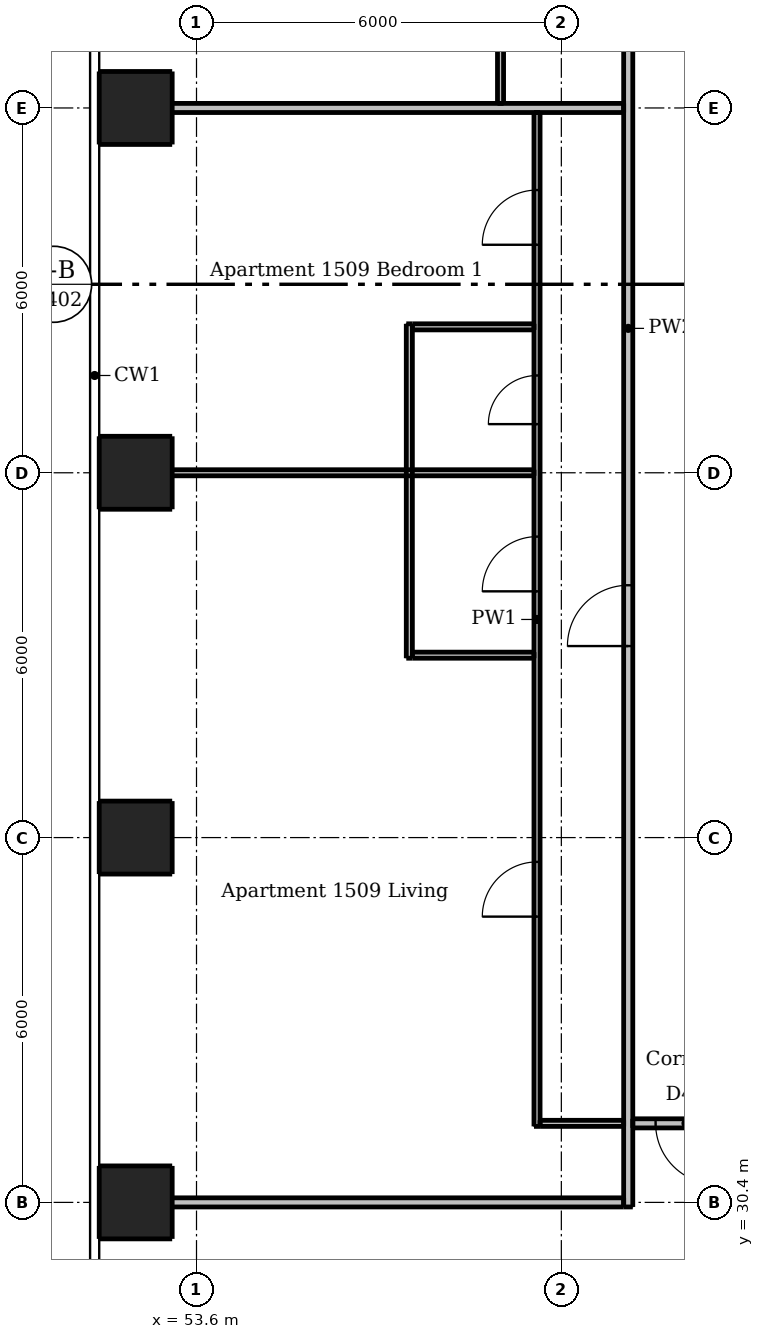
"""IFC4 building model, lengths in metres.
Left out: names, types, materials, properties, quantities, classifications, styles, units other than length and angle.
Written with IfcOpenShell. Run it as: python <this file> out.ifc"""

import sys

from ifc_helpers import new_model, si_unit, direction, frame, frame_2d, origin, origin_2d, place, context, subcontext, project, spatial, rectangle, extrude, element, fill, save


model = new_model("IFC4")
c1 = context("Model", 3, precision=1e-05, world=origin(), true_north=direction((0.0, 1.0)))
c2 = subcontext(c1, "Body", "Model", "MODEL_VIEW")
j1 = project(units=[si_unit("LENGTHUNIT", "METRE"), si_unit("PLANEANGLEUNIT", "RADIAN")], contexts=[c1])
p1 = place(None, origin())
s1 = spatial("IfcSite", under=j1, at=p1, CompositionType="ELEMENT")
p2 = place(p1, origin())
s2 = spatial("IfcBuilding", under=s1, at=p2, CompositionType="ELEMENT")
p3 = place(p2, frame((0.0, 0.0, 56.5)))
s3 = spatial("IfcBuildingStorey", under=s2, at=p3, CompositionType="ELEMENT", Elevation=56.5)
for number, where, z_axis, x_axis in (
    (1, (52.6, 30.4, 0.0), (0.0, 0.0, 1.0), (1.0, 0.0, 0.0)),
    (2, (52.6, 36.4, 0.0), (0.0, 0.0, 1.0), (1.0, 0.0, 0.0)),
    (3, (52.6, 42.4, 0.0), (0.0, 0.0, 1.0), (1.0, 0.0, 0.0)),
    (4, (52.6, 48.4, 0.0), (0.0, 0.0, 1.0), (1.0, 0.0, 0.0)),
):
    element("IfcColumn", number, at=place(p3, frame(where, z_axis=z_axis, x_axis=x_axis)), inside=s3, PredefinedType="COLUMN", context=c2, shape_type="SweptSolid", body=[
        extrude(rectangle(XDim=1.2, YDim=1.2, at=origin_2d()), origin(), (0.0, 0.0, 1.0), 3.05),
    ])
p4 = place(p3, frame((57.1, 39.35, 0.0), z_axis=(0.0, 0.0, 1.0), x_axis=(0.0, 1.0, 0.0)))
e5 = element("IfcWall", 5, at=p4, inside=s3, PredefinedType="PARTITIONING", context=c2, shape_type="SweptSolid", body=[
    extrude(rectangle(XDim=5.5, YDim=0.1, at=frame_2d((2.75, 0.0))), origin(), (0.0, 0.0, 1.0), 3.05),
])
p5 = place(p3, frame((58.6, 54.35, 0.0), z_axis=(0.0, 0.0, 1.0), x_axis=(0.0, -1.0, 0.0)))
e6 = element("IfcWall", 6, at=p5, inside=s3, PredefinedType="PARTITIONING", context=c2, shape_type="SweptSolid", body=[
    extrude(rectangle(XDim=5.875, YDim=0.1, at=frame_2d((2.938, 0.0))), origin(), (0.0, 0.0, 1.0), 3.05),
])
p6 = place(p5, frame((3.75, 0.0, 0.0)))
e7 = element("IfcOpeningElement", 7, at=p6, cuts=e6, PredefinedType="OPENING", context=c2, shape_type="SweptSolid", body=[
    extrude(rectangle(XDim=0.8, YDim=2.1, at=frame_2d((0.4, 1.05))), frame((0.0, 0.06, 0.0), z_axis=(0.0, -1.0, 0.0), x_axis=(1.0, 0.0, 0.0)), (0.0, 0.0, 1.0), 0.12),
])
p7 = place(p3, frame((59.2, 31.65, 0.0), z_axis=(0.0, 0.0, 1.0), x_axis=(0.0, 1.0, 0.0)))
e8 = element("IfcWall", 8, at=p7, inside=s3, PredefinedType="PARTITIONING", context=c2, shape_type="SweptSolid", body=[
    extrude(rectangle(XDim=16.675, YDim=0.1, at=frame_2d((8.337, 0.0))), origin(), (0.0, 0.0, 1.0), 3.05),
])
p8 = place(p7, frame((3.45, 0.0, 0.0)))
e9 = element("IfcOpeningElement", 9, at=p8, cuts=e8, PredefinedType="OPENING", context=c2, shape_type="SweptSolid", body=[
    extrude(rectangle(XDim=0.9, YDim=2.1, at=frame_2d((0.45, 1.05))), frame((0.0, 0.06, 0.0), z_axis=(0.0, -1.0, 0.0), x_axis=(1.0, 0.0, 0.0)), (0.0, 0.0, 1.0), 0.12),
])
p9 = place(p7, frame((8.8, 0.0, 0.0)))
e10 = element("IfcOpeningElement", 10, at=p9, cuts=e8, PredefinedType="OPENING", context=c2, shape_type="SweptSolid", body=[
    extrude(rectangle(XDim=0.9, YDim=2.1, at=frame_2d((0.45, 1.05))), frame((0.0, 0.06, 0.0), z_axis=(0.0, -1.0, 0.0), x_axis=(1.0, 0.0, 0.0)), (0.0, 0.0, 1.0), 0.12),
])
p10 = place(p7, frame((14.5, 0.0, 0.0)))
e11 = element("IfcOpeningElement", 11, at=p10, cuts=e8, PredefinedType="OPENING", context=c2, shape_type="SweptSolid", body=[
    extrude(rectangle(XDim=0.9, YDim=2.1, at=frame_2d((0.45, 1.05))), frame((0.0, 0.06, 0.0), z_axis=(0.0, -1.0, 0.0), x_axis=(1.0, 0.0, 0.0)), (0.0, 0.0, 1.0), 0.12),
])
p11 = place(p7, frame((11.55, 0.0, 0.0)))
e12 = element("IfcOpeningElement", 12, at=p11, cuts=e8, PredefinedType="OPENING", context=c2, shape_type="SweptSolid", body=[
    extrude(rectangle(XDim=0.8, YDim=2.1, at=frame_2d((0.4, 1.05))), frame((0.0, 0.06, 0.0), z_axis=(0.0, -1.0, 0.0), x_axis=(1.0, 0.0, 0.0)), (0.0, 0.0, 1.0), 0.12),
])
p12 = place(p3, frame((57.15, 44.8, 0.0), z_axis=(0.0, 0.0, 1.0), x_axis=(1.0, 0.0, 0.0)))
e13 = element("IfcWall", 13, at=p12, inside=s3, PredefinedType="PARTITIONING", context=c2, shape_type="SweptSolid", body=[
    extrude(rectangle(XDim=2.0, YDim=0.1, at=frame_2d((1.0, 0.0))), origin(), (0.0, 0.0, 1.0), 3.05),
])
p13 = place(p3, frame((52.0, 42.4, 0.0), z_axis=(0.0, 0.0, 1.0), x_axis=(1.0, 0.0, 0.0)))
e14 = element("IfcWall", 14, at=p13, inside=s3, PredefinedType="PARTITIONING", context=c2, shape_type="SweptSolid", body=[
    extrude(rectangle(XDim=7.15, YDim=0.1, at=frame_2d((3.575, 0.0))), origin(), (0.0, 0.0, 1.0), 2.516),
])
p14 = place(p3, frame((57.15, 39.4, 0.0), z_axis=(0.0, 0.0, 1.0), x_axis=(1.0, 0.0, 0.0)))
e15 = element("IfcWall", 15, at=p14, inside=s3, PredefinedType="PARTITIONING", context=c2, shape_type="SweptSolid", body=[
    extrude(rectangle(XDim=2.0, YDim=0.1, at=frame_2d((1.0, 0.0))), origin(), (0.0, 0.0, 1.0), 3.05),
])
p15 = place(p3, frame((59.25, 31.7, 0.0), z_axis=(0.0, 0.0, 1.0), x_axis=(1.0, 0.0, 0.0)))
e16 = element("IfcWall", 16, at=p15, inside=s3, PredefinedType="PARTITIONING", context=c2, shape_type="SweptSolid", body=[
    extrude(rectangle(XDim=1.375, YDim=0.1, at=frame_2d((0.688, 0.0))), origin(), (0.0, 0.0, 1.0), 3.05),
])
p16 = place(p3, frame((60.7, 30.325, 0.0), z_axis=(0.0, 0.0, 1.0), x_axis=(0.0, 1.0, 0.0)))
e17 = element("IfcWall", 17, at=p16, inside=s3, PredefinedType="PARTITIONING", context=c2, shape_type="SweptSolid", body=[
    extrude(rectangle(XDim=28.9, YDim=0.15, at=frame_2d((14.45, 0.0))), origin(), (0.0, 0.0, 1.0), 3.05),
])
p17 = place(p16, frame((9.225, 0.0, 0.0)))
e18 = element("IfcOpeningElement", 18, at=p17, cuts=e17, PredefinedType="OPENING", context=c2, shape_type="SweptSolid", body=[
    extrude(rectangle(XDim=1.0, YDim=2.1, at=frame_2d((0.5, 1.05))), frame((0.0, 0.085, 0.0), z_axis=(0.0, -1.0, 0.0), x_axis=(1.0, 0.0, 0.0)), (0.0, 0.0, 1.0), 0.17),
])
p18 = place(p16, frame((26.025, 0.0, 0.0)))
e19 = element("IfcOpeningElement", 19, at=p18, cuts=e17, PredefinedType="OPENING", context=c2, shape_type="SweptSolid", body=[
    extrude(rectangle(XDim=1.0, YDim=2.1, at=frame_2d((0.5, 1.05))), frame((0.0, 0.085, 0.0), z_axis=(0.0, -1.0, 0.0), x_axis=(1.0, 0.0, 0.0)), (0.0, 0.0, 1.0), 0.17),
])
p19 = place(p3, frame((52.0, 48.4, 0.0), z_axis=(0.0, 0.0, 1.0), x_axis=(1.0, 0.0, 0.0)))
e20 = element("IfcWall", 20, at=p19, inside=s3, PredefinedType="PARTITIONING", context=c2, shape_type="SweptSolid", body=[
    extrude(rectangle(XDim=8.625, YDim=0.15, at=frame_2d((4.312, 0.0))), origin(), (0.0, 0.0, 1.0), 2.516),
])
p20 = place(p3, frame((89.525, 31.7, 0.0), z_axis=(0.0, 0.0, 1.0), x_axis=(-1.0, 0.0, 0.0)))
e21 = element("IfcWall", 21, at=p20, inside=s3, PredefinedType="PARTITIONING", context=c2, shape_type="SweptSolid", body=[
    extrude(rectangle(XDim=28.75, YDim=0.15, at=frame_2d((14.375, 0.0))), origin(), (0.0, 0.0, 1.0), 3.05),
])
p21 = place(p20, frame((27.375, 0.0, 0.0)))
e22 = element("IfcOpeningElement", 22, at=p21, cuts=e21, PredefinedType="OPENING", context=c2, shape_type="SweptSolid", body=[
    extrude(rectangle(XDim=1.0, YDim=2.1, at=frame_2d((0.5, 1.05))), frame((0.0, 0.085, 0.0), z_axis=(0.0, -1.0, 0.0), x_axis=(1.0, 0.0, 0.0)), (0.0, 0.0, 1.0), 0.17),
])
p22 = place(p20, frame((12.625, 0.0, 0.0)))
e23 = element("IfcOpeningElement", 23, at=p22, cuts=e21, PredefinedType="OPENING", context=c2, shape_type="SweptSolid", body=[
    extrude(rectangle(XDim=1.0, YDim=2.1, at=frame_2d((0.5, 1.05))), frame((0.0, 0.085, 0.0), z_axis=(0.0, -1.0, 0.0), x_axis=(1.0, 0.0, 0.0)), (0.0, 0.0, 1.0), 0.17),
])
p23 = place(p20, frame((4.225, 0.0, 0.0)))
e24 = element("IfcOpeningElement", 24, at=p23, cuts=e21, PredefinedType="OPENING", context=c2, shape_type="SweptSolid", body=[
    extrude(rectangle(XDim=1.0, YDim=2.1, at=frame_2d((0.5, 1.05))), frame((0.0, 0.085, 0.0), z_axis=(0.0, -1.0, 0.0), x_axis=(1.0, 0.0, 0.0)), (0.0, 0.0, 1.0), 0.17),
])
p24 = place(p3, frame((52.0, 30.4, 0.0), z_axis=(0.0, 0.0, 1.0), x_axis=(1.0, 0.0, 0.0)))
e25 = element("IfcWall", 25, at=p24, inside=s3, PredefinedType="PARTITIONING", context=c2, shape_type="SweptSolid", body=[
    extrude(rectangle(XDim=8.625, YDim=0.15, at=frame_2d((4.312, 0.0))), origin(), (0.0, 0.0, 1.0), 2.647),
])
p25 = place(p21, origin())
e26 = element("IfcDoor", 26, at=p25, inside=s3, OperationType="SINGLE_SWING_LEFT", PredefinedType="DOOR", context=c2, shape_type="SweptSolid", body=[
    extrude(rectangle(XDim=1.0, YDim=2.1, at=frame_2d((0.5, 1.05))), frame((0.0, 0.025, 0.0), z_axis=(0.0, -1.0, 0.0), x_axis=(1.0, 0.0, 0.0)), (0.0, 0.0, 1.0), 0.05),
])
fill(e22, e26)
p26 = place(p17, origin())
e27 = element("IfcDoor", 27, at=p26, inside=s3, OperationType="SINGLE_SWING_LEFT", PredefinedType="DOOR", context=c2, shape_type="SweptSolid", body=[
    extrude(rectangle(XDim=1.0, YDim=2.1, at=frame_2d((0.5, 1.05))), frame((0.0, 0.025, 0.0), z_axis=(0.0, -1.0, 0.0), x_axis=(1.0, 0.0, 0.0)), (0.0, 0.0, 1.0), 0.05),
])
fill(e18, e27)
p27 = place(p8, origin())
e28 = element("IfcDoor", 28, at=p27, inside=s3, OperationType="SINGLE_SWING_LEFT", PredefinedType="DOOR", context=c2, shape_type="SweptSolid", body=[
    extrude(rectangle(XDim=0.9, YDim=2.1, at=frame_2d((0.45, 1.05))), frame((0.0, 0.025, 0.0), z_axis=(0.0, -1.0, 0.0), x_axis=(1.0, 0.0, 0.0)), (0.0, 0.0, 1.0), 0.05),
])
fill(e9, e28)
p28 = place(p9, origin())
e29 = element("IfcDoor", 29, at=p28, inside=s3, OperationType="SINGLE_SWING_LEFT", PredefinedType="DOOR", context=c2, shape_type="SweptSolid", body=[
    extrude(rectangle(XDim=0.9, YDim=2.1, at=frame_2d((0.45, 1.05))), frame((0.0, 0.025, 0.0), z_axis=(0.0, -1.0, 0.0), x_axis=(1.0, 0.0, 0.0)), (0.0, 0.0, 1.0), 0.05),
])
fill(e10, e29)
p29 = place(p10, origin())
e30 = element("IfcDoor", 30, at=p29, inside=s3, OperationType="SINGLE_SWING_LEFT", PredefinedType="DOOR", context=c2, shape_type="SweptSolid", body=[
    extrude(rectangle(XDim=0.9, YDim=2.1, at=frame_2d((0.45, 1.05))), frame((0.0, 0.025, 0.0), z_axis=(0.0, -1.0, 0.0), x_axis=(1.0, 0.0, 0.0)), (0.0, 0.0, 1.0), 0.05),
])
fill(e11, e30)
p30 = place(p11, origin())
e31 = element("IfcDoor", 31, at=p30, inside=s3, OperationType="SINGLE_SWING_LEFT", PredefinedType="DOOR", context=c2, shape_type="SweptSolid", body=[
    extrude(rectangle(XDim=0.8, YDim=2.1, at=frame_2d((0.4, 1.05))), frame((0.0, 0.025, 0.0), z_axis=(0.0, -1.0, 0.0), x_axis=(1.0, 0.0, 0.0)), (0.0, 0.0, 1.0), 0.05),
])
fill(e12, e31)
save(model, sys.argv[1])
